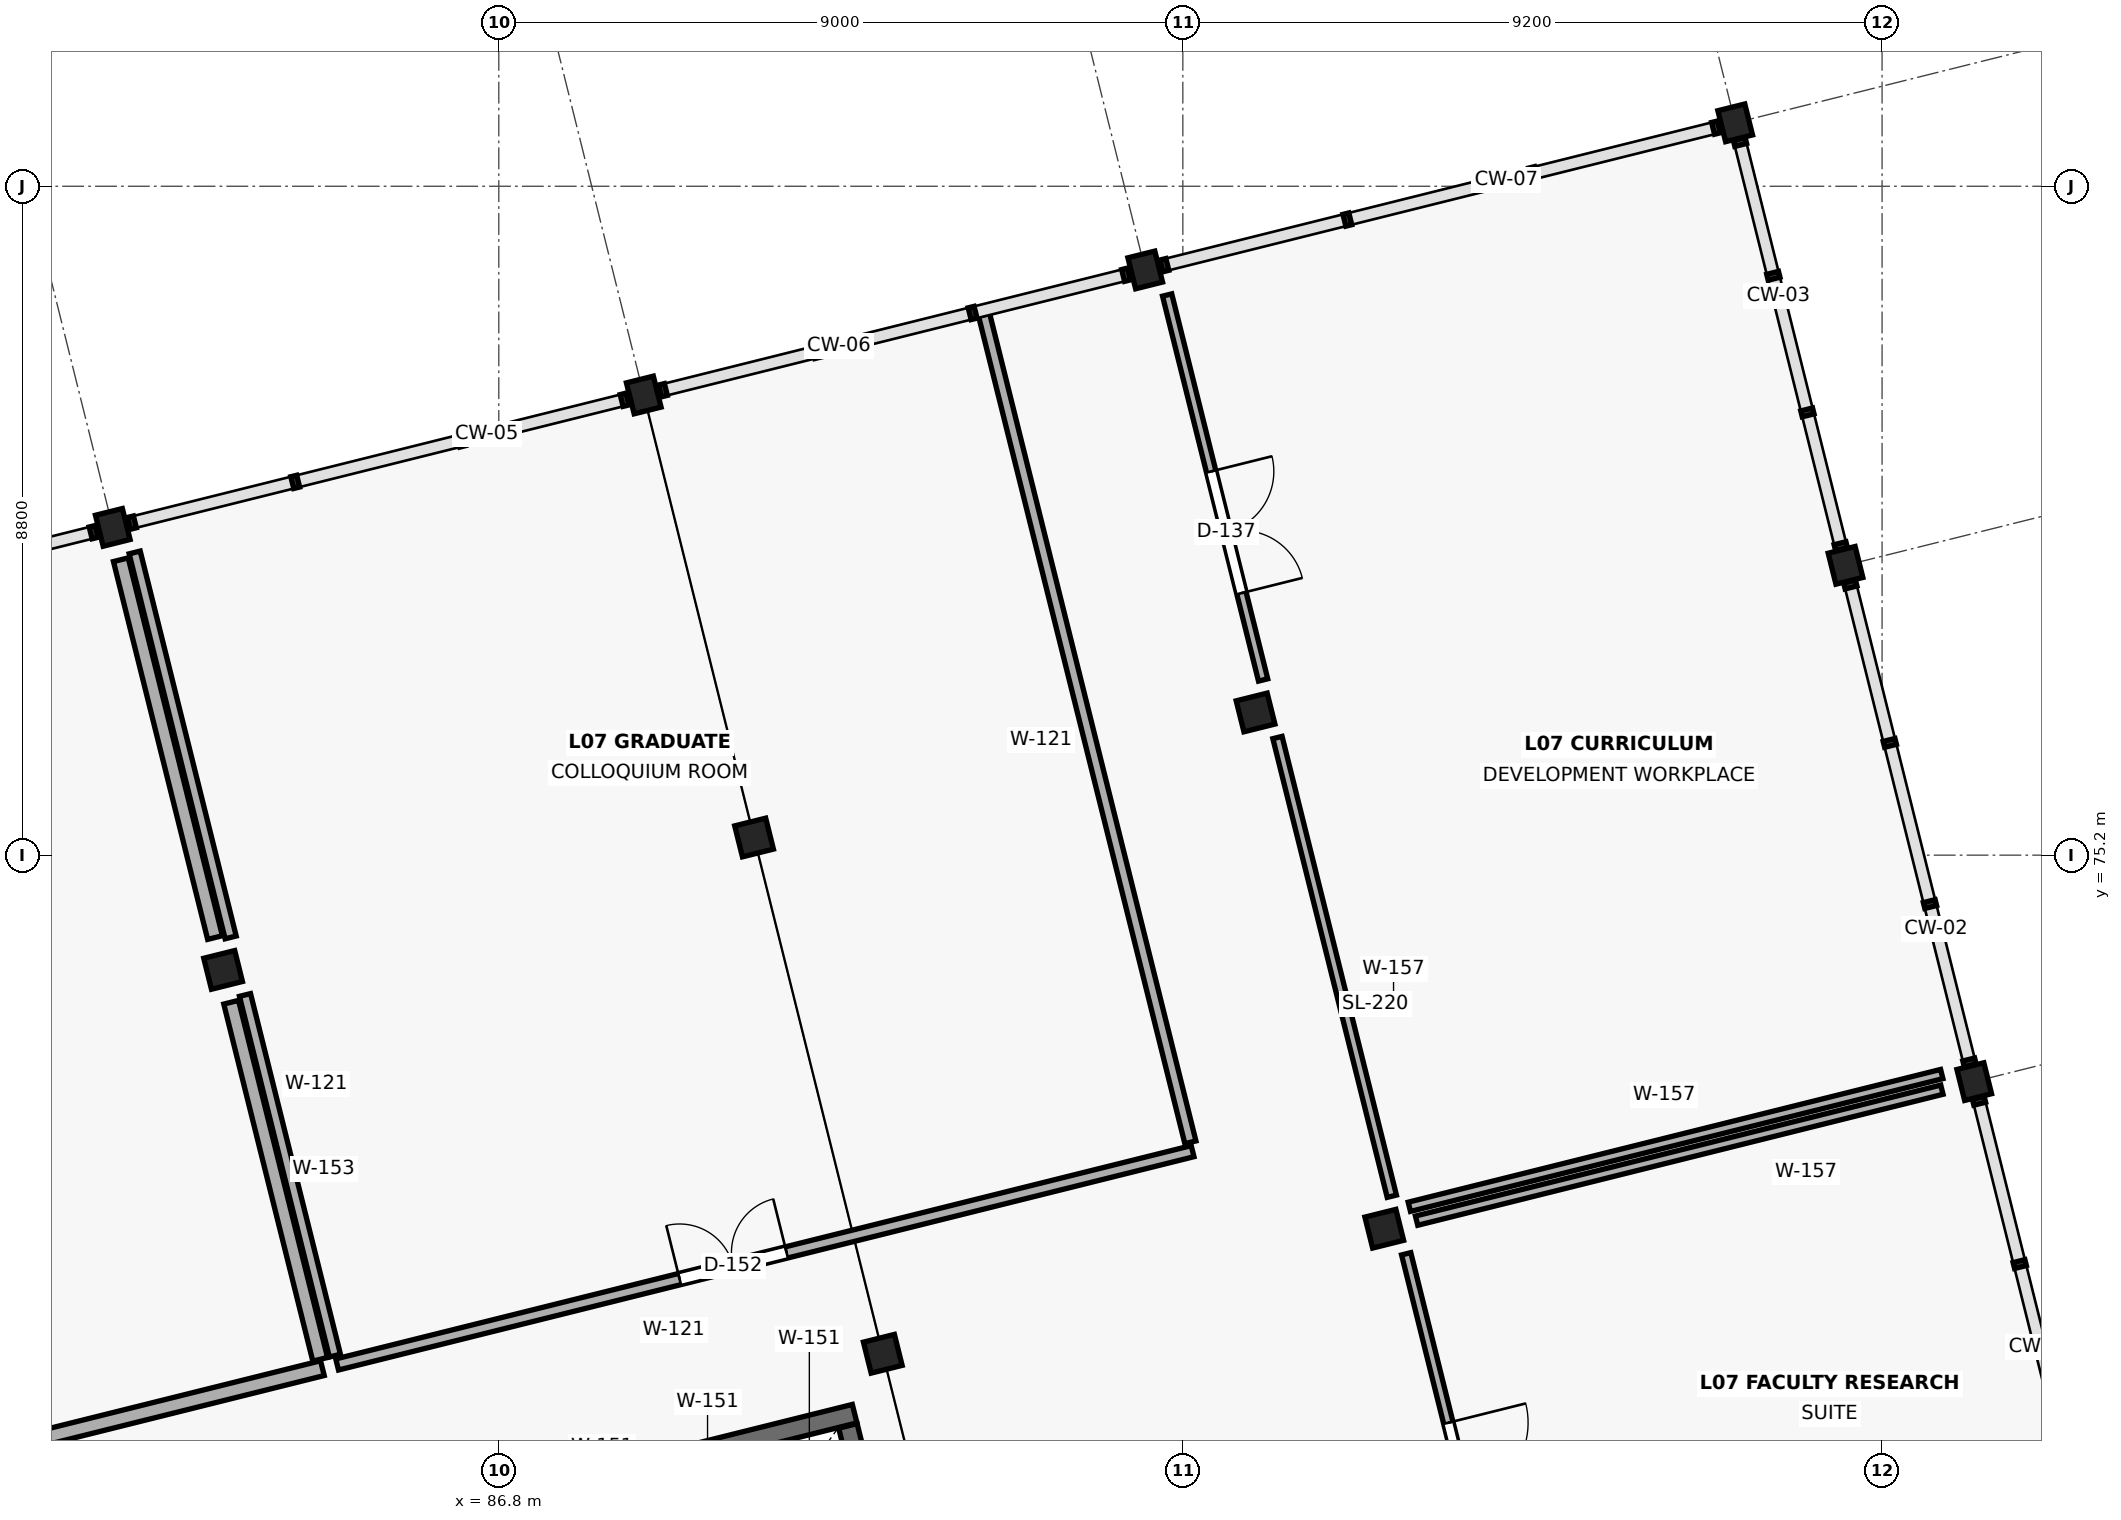
"""IFC4 building model, lengths in metres.
Left out: names, types, materials, properties, quantities, classifications, styles, units other than length and angle.
Written with IfcOpenShell. Run it as: python <this file> out.ifc"""

import sys

from ifc_helpers import new_model, si_unit, direction, frame, frame_2d, origin, origin_2d, place, context, subcontext, project, spatial, rectangle, extrude, element, fill, save


model = new_model("IFC4")
c1 = context("Model", 3, precision=1e-05, world=origin(), true_north=direction((0.0, 1.0)))
c2 = subcontext(c1, "Body", "Model", "MODEL_VIEW")
j1 = project(units=[si_unit("LENGTHUNIT", "METRE"), si_unit("PLANEANGLEUNIT", "RADIAN")], contexts=[c1])
p1 = place(None, origin())
s1 = spatial("IfcSite", under=j1, at=p1, CompositionType="ELEMENT")
p2 = place(p1, origin())
s2 = spatial("IfcBuilding", under=s1, at=p2, CompositionType="ELEMENT")
p3 = place(p2, frame((0.0, 0.0, 30.0)))
s3 = spatial("IfcBuildingStorey", under=s2, at=p3, CompositionType="ELEMENT", Elevation=30.0)
p4 = place(p3, frame((83.173, 73.691, 0.0), z_axis=(0.0, 0.0, 1.0), x_axis=(0.970295726276, 0.2419218956, 0.0)))
e1 = element("IfcColumn", 1, at=p4, inside=s3, PredefinedType="COLUMN", context=c2, shape_type="SweptSolid", body=[
    extrude(rectangle(XDim=0.42, YDim=0.42, at=origin_2d()), origin(), (0.0, 0.0, 1.0), 3.9),
])
p5 = place(p3, frame((81.721, 79.512, 0.0), z_axis=(0.0, 0.0, 1.0), x_axis=(0.970295726276, 0.2419218956, 0.0)))
e2 = element("IfcColumn", 2, at=p5, inside=s3, PredefinedType="COLUMN", context=c2, shape_type="SweptSolid", body=[
    extrude(rectangle(XDim=0.365, YDim=0.42, at=origin_2d()), origin(), (0.0, 0.0, 1.0), 3.9),
])
for number, where, z_axis, x_axis in (
    (3, (91.852, 68.64, 0.0), (0.0, 0.0, 1.0), (0.97, 0.242, 0.0)),
    (4, (90.159, 75.432, 0.0), (0.0, 0.0, 1.0), (0.97, 0.242, 0.0)),
):
    element("IfcColumn", number, at=place(p3, frame(where, z_axis=z_axis, x_axis=x_axis)), inside=s3, PredefinedType="COLUMN", context=c2, shape_type="SweptSolid", body=[
        extrude(rectangle(XDim=0.42, YDim=0.42, at=origin_2d()), origin(), (0.0, 0.0, 1.0), 3.9),
    ])
p6 = place(p3, frame((88.707, 81.254, 0.0), z_axis=(0.0, 0.0, 1.0), x_axis=(0.970295726276, 0.2419218956, 0.0)))
e5 = element("IfcColumn", 5, at=p6, inside=s3, PredefinedType="COLUMN", context=c2, shape_type="SweptSolid", body=[
    extrude(rectangle(XDim=0.365, YDim=0.42, at=origin_2d()), origin(), (0.0, 0.0, 1.0), 3.9),
])
for number, where, z_axis, x_axis in (
    (6, (98.45, 70.285, 0.0), (0.0, 0.0, 1.0), (0.97, 0.242, 0.0)),
    (7, (96.757, 77.077, 0.0), (0.0, 0.0, 1.0), (0.97, 0.242, 0.0)),
):
    element("IfcColumn", number, at=place(p3, frame(where, z_axis=z_axis, x_axis=x_axis)), inside=s3, PredefinedType="COLUMN", context=c2, shape_type="SweptSolid", body=[
        extrude(rectangle(XDim=0.42, YDim=0.42, at=origin_2d()), origin(), (0.0, 0.0, 1.0), 3.9),
    ])
for number, where, z_axis, x_axis in (
    (8, (95.305, 82.899, 0.0), (0.0, 0.0, 1.0), (0.97, 0.242, 0.0)),
    (9, (106.213, 72.221, 0.0), (0.0, 0.0, 1.0), (0.97, 0.242, 0.0)),
    (10, (104.519, 79.013, 0.0), (0.0, 0.0, 1.0), (0.97, 0.242, 0.0)),
    (11, (103.068, 84.835, 0.0), (0.0, 0.0, 1.0), (0.97, 0.242, 0.0)),
):
    element("IfcColumn", number, at=place(p3, frame(where, z_axis=z_axis, x_axis=x_axis)), inside=s3, PredefinedType="COLUMN", context=c2, shape_type="SweptSolid", body=[
        extrude(rectangle(XDim=0.365, YDim=0.42, at=origin_2d()), origin(), (0.0, 0.0, 1.0), 3.9),
    ])
p7 = place(p3, frame((91.482, 67.852, 0.0), z_axis=(0.0, 0.0, 1.0), x_axis=(-0.970296596103, -0.241918406889, 0.0)))
e12 = element("IfcWall", 12, at=p7, inside=s3, PredefinedType="SHEAR", context=c2, shape_type="SweptSolid", body=[
    extrude(rectangle(XDim=6.05, YDim=0.25, at=frame_2d((3.025, 0.0))), origin(), (0.0, 0.0, 1.0), 3.72),
])
p8 = place(p3, frame((91.921, 65.576, 0.0), z_axis=(0.0, 0.0, 1.0), x_axis=(-0.241903146974, 0.970300400641, 0.0)))
e13 = element("IfcWall", 13, at=p8, inside=s3, PredefinedType="SHEAR", context=c2, shape_type="SweptSolid", body=[
    extrude(rectangle(XDim=2.18, YDim=0.25, at=frame_2d((1.09, 0.0))), origin(), (0.0, 0.0, 1.0), 3.72),
])
p9 = place(p3, frame((63.191, 63.143, 0.0), z_axis=(0.0, 0.0, 1.0), x_axis=(0.970297434182, 0.241915045462, 0.0)))
e14 = element("IfcWall", 14, at=p9, inside=s3, PredefinedType="STANDARD", context=c2, shape_type="SweptSolid", body=[
    extrude(rectangle(XDim=21.94, YDim=0.2, at=frame_2d((10.97, 0.0))), origin(), (0.0, 0.0, 1.0), 3.72),
])
p10 = place(p9, frame((9.332, 0.0, 0.0)))
e15 = element("IfcOpeningElement", 15, at=p10, cuts=e14, PredefinedType="OPENING", context=c2, shape_type="SweptSolid", body=[
    extrude(rectangle(XDim=1.3, YDim=2.25, at=frame_2d((0.65, 1.125))), frame((0.0, 0.112, 0.0), z_axis=(0.0, -1.0, 0.0), x_axis=(1.0, 0.0, 0.0)), (0.0, 0.0, 1.0), 0.224),
])
p11 = place(p3, frame((84.45, 68.567, 0.0), z_axis=(0.0, 0.0, 1.0), x_axis=(-0.241894861771, 0.970302466166, 0.0)))
e16 = element("IfcWall", 16, at=p11, inside=s3, PredefinedType="STANDARD", context=c2, shape_type="SweptSolid", body=[
    extrude(rectangle(XDim=4.842, YDim=0.2, at=frame_2d((2.421, 0.0))), origin(), (0.0, 0.0, 1.0), 3.035),
])
p12 = place(p3, frame((83.067, 74.116, 0.0), z_axis=(0.0, 0.0, 1.0), x_axis=(-0.241941301347, 0.970290887674, 0.0)))
e17 = element("IfcWall", 17, at=p12, inside=s3, PredefinedType="STANDARD", context=c2, shape_type="SweptSolid", body=[
    extrude(rectangle(XDim=5.123, YDim=0.2, at=frame_2d((2.562, 0.0))), origin(), (0.0, 0.0, 1.0), 3.035),
])
p13 = place(p3, frame((84.673, 68.499, 0.0), z_axis=(0.0, 0.0, 1.0), x_axis=(0.970293352795, 0.241931414914, 0.0)))
e18 = element("IfcWall", 18, at=p13, inside=s3, PredefinedType="PARTITIONING", context=c2, shape_type="SweptSolid", body=[
    extrude(rectangle(XDim=11.6, YDim=0.15, at=frame_2d((5.8, 0.0))), origin(), (0.0, 0.0, 1.0), 3.72),
])
p14 = place(p13, frame((4.644, 0.0, 0.0)))
e19 = element("IfcOpeningElement", 19, at=p14, cuts=e18, PredefinedType="OPENING", context=c2, shape_type="SweptSolid", body=[
    extrude(rectangle(XDim=1.45, YDim=2.35, at=frame_2d((0.725, 1.175))), frame((0.0, 0.087, 0.0), z_axis=(0.0, -1.0, 0.0), x_axis=(1.0, 0.0, 0.0)), (0.0, 0.0, 1.0), 0.174),
])
p15 = place(p3, frame((95.899, 71.422, 0.0), z_axis=(0.0, 0.0, 1.0), x_axis=(-0.241921192876, 0.970295901485, 0.0)))
e20 = element("IfcWall", 20, at=p15, inside=s3, PredefinedType="PARTITIONING", context=c2, shape_type="SweptSolid", body=[
    extrude(rectangle(XDim=11.22, YDim=0.15, at=frame_2d((5.61, 0.0))), origin(), (0.0, 0.0, 1.0), 3.3),
])
p16 = place(p3, frame((82.01, 79.183, 0.0), z_axis=(0.0, 0.0, 1.0), x_axis=(0.241908270235, -0.970299123359, 0.0)))
e21 = element("IfcWall", 21, at=p16, inside=s3, PredefinedType="PARTITIONING", context=c2, shape_type="SweptSolid", body=[
    extrude(rectangle(XDim=5.22, YDim=0.15, at=frame_2d((2.61, 0.0))), origin(), (0.0, 0.0, 1.0), 3.72),
])
p17 = place(p3, frame((83.461, 73.361, 0.0), z_axis=(0.0, 0.0, 1.0), x_axis=(0.241924759673, -0.970295012178, 0.0)))
e22 = element("IfcWall", 22, at=p17, inside=s3, PredefinedType="PARTITIONING", context=c2, shape_type="SweptSolid", body=[
    extrude(rectangle(XDim=4.89, YDim=0.15, at=frame_2d((2.445, 0.0))), origin(), (0.0, 0.0, 1.0), 3.72),
])
p18 = place(p3, frame((105.787, 72.115, 0.0), z_axis=(0.0, 0.0, 1.0), x_axis=(-0.97029150847, -0.241938811667, 0.0)))
e23 = element("IfcWall", 23, at=p18, inside=s3, PredefinedType="PARTITIONING", context=c2, shape_type="SweptSolid", body=[
    extrude(rectangle(XDim=7.123, YDim=0.125, at=frame_2d((3.562, 0.0))), origin(), (0.0, 0.0, 1.0), 3.035),
])
p19 = place(p3, frame((98.739, 69.956, 0.0), z_axis=(0.0, 0.0, 1.0), x_axis=(0.241945001105, -0.970289965134, 0.0)))
e24 = element("IfcWall", 24, at=p19, inside=s3, PredefinedType="PARTITIONING", context=c2, shape_type="SweptSolid", body=[
    extrude(rectangle(XDim=6.42, YDim=0.125, at=frame_2d((3.21, 0.0))), origin(), (0.0, 0.0, 1.0), 3.72),
])
p20 = place(p19, frame((2.291, 0.0, 0.0)))
e25 = element("IfcOpeningElement", 25, at=p20, cuts=e24, PredefinedType="OPENING", context=c2, shape_type="SweptSolid", body=[
    extrude(rectangle(XDim=1.05, YDim=2.25, at=frame_2d((0.525, 1.125))), frame((0.0, 0.074, 0.0), z_axis=(0.0, -1.0, 0.0), x_axis=(1.0, 0.0, 0.0)), (0.0, 0.0, 1.0), 0.149),
])
p21 = place(p3, frame((98.78, 70.574, 0.0), z_axis=(0.0, 0.0, 1.0), x_axis=(0.970295475322, 0.241922902117, 0.0)))
e26 = element("IfcWall", 26, at=p21, inside=s3, PredefinedType="PARTITIONING", context=c2, shape_type="SweptSolid", body=[
    extrude(rectangle(XDim=7.219, YDim=0.125, at=frame_2d((3.61, 0.0))), origin(), (0.0, 0.0, 1.0), 3.72),
])
p22 = place(p3, frame((95.594, 82.569, 0.0), z_axis=(0.0, 0.0, 1.0), x_axis=(0.241919249358, -0.970296386054, 0.0)))
e27 = element("IfcWall", 27, at=p22, inside=s3, PredefinedType="PARTITIONING", context=c2, shape_type="SweptSolid", body=[
    extrude(rectangle(XDim=5.219, YDim=0.125, at=frame_2d((2.61, 0.0))), origin(), (0.0, 0.0, 1.0), 3.72),
])
p23 = place(p22, frame((2.392, 0.0, 0.0)))
e28 = element("IfcOpeningElement", 28, at=p23, cuts=e27, PredefinedType="OPENING", context=c2, shape_type="SweptSolid", body=[
    extrude(rectangle(XDim=1.65, YDim=2.35, at=frame_2d((0.825, 1.175))), frame((0.0, 0.074, 0.0), z_axis=(0.0, -1.0, 0.0), x_axis=(1.0, 0.0, 0.0)), (0.0, 0.0, 1.0), 0.149),
])
p24 = place(p3, frame((97.045, 76.748, 0.0), z_axis=(0.0, 0.0, 1.0), x_axis=(0.241925976618, -0.970294708755, 0.0)))
e29 = element("IfcWall", 29, at=p24, inside=s3, PredefinedType="PARTITIONING", context=c2, shape_type="SweptSolid", body=[
    extrude(rectangle(XDim=6.219, YDim=0.125, at=frame_2d((3.11, 0.0))), origin(), (0.0, 0.0, 1.0), 3.72),
])
p25 = place(p14, origin())
e30 = element("IfcDoor", 30, at=p25, inside=s3, OperationType="DOUBLE_DOOR_SINGLE_SWING", PredefinedType="DOOR", context=c2, shape_type="SweptSolid", body=[
    extrude(rectangle(XDim=1.45, YDim=2.35, at=frame_2d((0.725, 1.175))), frame((0.0, 0.025, 0.0), z_axis=(0.0, -1.0, 0.0), x_axis=(1.0, 0.0, 0.0)), (0.0, 0.0, 1.0), 0.05),
])
fill(e19, e30)
p26 = place(p20, origin())
e31 = element("IfcDoor", 31, at=p26, inside=s3, OperationType="SINGLE_SWING_LEFT", PredefinedType="DOOR", context=c2, shape_type="SweptSolid", body=[
    extrude(rectangle(XDim=1.05, YDim=2.25, at=frame_2d((0.525, 1.125))), frame((0.0, 0.025, 0.0), z_axis=(0.0, -1.0, 0.0), x_axis=(1.0, 0.0, 0.0)), (0.0, 0.0, 1.0), 0.05),
])
fill(e25, e31)
p27 = place(p23, origin())
e32 = element("IfcDoor", 32, at=p27, inside=s3, OperationType="DOUBLE_DOOR_SINGLE_SWING", PredefinedType="DOOR", context=c2, shape_type="SweptSolid", body=[
    extrude(rectangle(XDim=1.65, YDim=2.35, at=frame_2d((0.825, 1.175))), frame((0.0, 0.025, 0.0), z_axis=(0.0, -1.0, 0.0), x_axis=(1.0, 0.0, 0.0)), (0.0, 0.0, 1.0), 0.05),
])
fill(e28, e32)
save(model, sys.argv[1])
